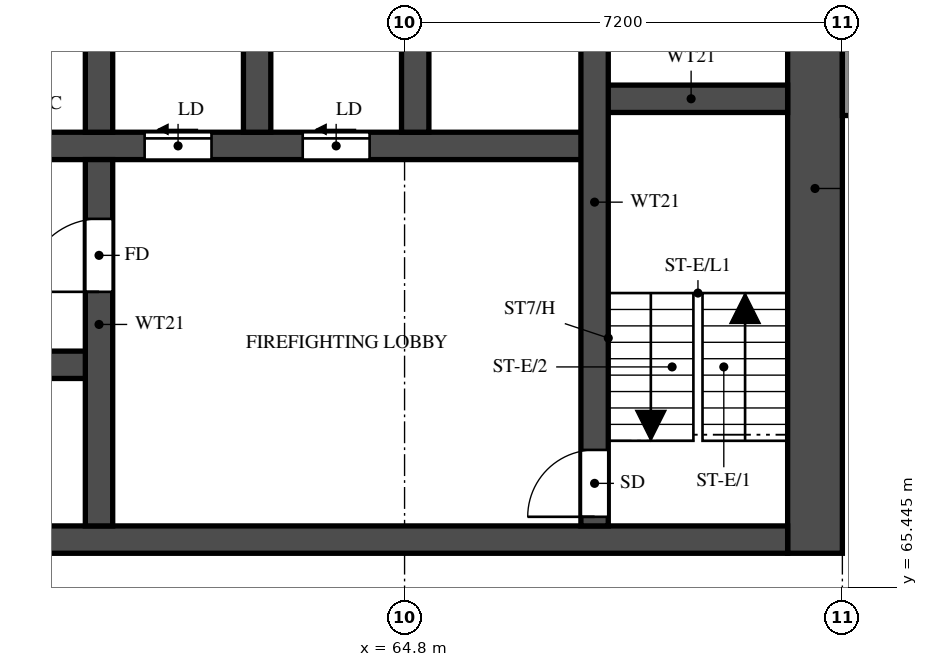
"""IFC4 building model, lengths in metres.
Left out: names, types, materials, properties, quantities, classifications, styles, units other than length and angle.
Written with IfcOpenShell. Run it as: python <this file> out.ifc"""

import sys

from ifc_helpers import new_model, si_unit, direction, frame, frame_2d, origin, place, context, subcontext, project, spatial, rectangle, extrude, element, fill, save


model = new_model("IFC4")
c1 = context("Model", 3, precision=1e-05, world=origin(), true_north=direction((0.0, 1.0)))
c2 = subcontext(c1, "Body", "Model", "MODEL_VIEW")
j1 = project(units=[si_unit("LENGTHUNIT", "METRE"), si_unit("PLANEANGLEUNIT", "RADIAN")], contexts=[c1])
p1 = place(None, origin())
s1 = spatial("IfcSite", under=j1, at=p1, CompositionType="ELEMENT")
p2 = place(p1, origin())
s2 = spatial("IfcBuilding", under=s1, at=p2, CompositionType="ELEMENT")
p3 = place(p2, frame((0.0, 0.0, 100.5)))
s3 = spatial("IfcBuildingStorey", under=s2, at=p3, CompositionType="ELEMENT", Elevation=100.5)
p4 = place(p3, frame((71.55, 66.0, 0.0), z_axis=(0.0, 0.0, 1.0), x_axis=(0.0, 1.0, 0.0)))
e1 = element("IfcWall", 1, at=p4, inside=s3, PredefinedType="SHEAR", context=c2, shape_type="SweptSolid", body=[
    extrude(rectangle(XDim=12.0, YDim=0.9, at=frame_2d((6.0, 0.0))), origin(), (0.0, 0.0, 1.0), 3.18),
])
p5 = place(p3, frame((29.7, 66.225, 0.0), z_axis=(0.0, 0.0, 1.0), x_axis=(1.0, 0.0, 0.0)))
e2 = element("IfcWall", 2, at=p5, inside=s3, PredefinedType="SHEAR", context=c2, shape_type="SweptSolid", body=[
    extrude(rectangle(XDim=41.4, YDim=0.45, at=frame_2d((20.7, 0.0))), origin(), (0.0, 0.0, 1.0), 3.18),
])
p6 = place(p5, frame((0.925, 0.0, 0.0)))
e3 = element("IfcOpeningElement", 3, at=p6, cuts=e2, PredefinedType="OPENING", context=c2, shape_type="SweptSolid", body=[
    extrude(rectangle(XDim=1.1, YDim=2.1, at=frame_2d((0.55, 1.05))), frame((0.0, 0.235, 0.0), z_axis=(0.0, -1.0, 0.0), x_axis=(1.0, 0.0, 0.0)), (0.0, 0.0, 1.0), 0.47),
])
p7 = place(p5, frame((3.738, 0.0, 0.0)))
e4 = element("IfcOpeningElement", 4, at=p7, cuts=e2, PredefinedType="OPENING", context=c2, shape_type="SweptSolid", body=[
    extrude(rectangle(XDim=1.8, YDim=2.1, at=frame_2d((0.9, 1.05))), frame((0.0, 0.235, 0.0), z_axis=(0.0, -1.0, 0.0), x_axis=(1.0, 0.0, 0.0)), (0.0, 0.0, 1.0), 0.47),
])
p8 = place(p3, frame((35.575, 69.1, 0.0), z_axis=(0.0, 0.0, 1.0), x_axis=(1.0, 0.0, 0.0)))
e5 = element("IfcWall", 5, at=p8, inside=s3, PredefinedType="SHEAR", context=c2, shape_type="SweptSolid", body=[
    extrude(rectangle(XDim=24.2, YDim=0.45, at=frame_2d((12.1, 0.0))), origin(), (0.0, 0.0, 1.0), 3.18),
])
p9 = place(p8, frame((1.05, 0.0, 0.0)))
e6 = element("IfcOpeningElement", 6, at=p9, cuts=e5, PredefinedType="OPENING", context=c2, shape_type="SweptSolid", body=[
    extrude(rectangle(XDim=1.1, YDim=2.1, at=frame_2d((0.55, 1.05))), frame((0.0, 0.235, 0.0), z_axis=(0.0, -1.0, 0.0), x_axis=(1.0, 0.0, 0.0)), (0.0, 0.0, 1.0), 0.47),
])
p10 = place(p8, frame((3.8, 0.0, 0.0)))
e7 = element("IfcOpeningElement", 7, at=p10, cuts=e5, PredefinedType="OPENING", context=c2, shape_type="SweptSolid", body=[
    extrude(rectangle(XDim=1.1, YDim=2.1, at=frame_2d((0.55, 1.05))), frame((0.0, 0.235, 0.0), z_axis=(0.0, -1.0, 0.0), x_axis=(1.0, 0.0, 0.0)), (0.0, 0.0, 1.0), 0.47),
])
p11 = place(p8, frame((6.55, 0.0, 0.0)))
e8 = element("IfcOpeningElement", 8, at=p11, cuts=e5, PredefinedType="OPENING", context=c2, shape_type="SweptSolid", body=[
    extrude(rectangle(XDim=1.1, YDim=2.1, at=frame_2d((0.55, 1.05))), frame((0.0, 0.235, 0.0), z_axis=(0.0, -1.0, 0.0), x_axis=(1.0, 0.0, 0.0)), (0.0, 0.0, 1.0), 0.47),
])
p12 = place(p8, frame((9.3, 0.0, 0.0)))
e9 = element("IfcOpeningElement", 9, at=p12, cuts=e5, PredefinedType="OPENING", context=c2, shape_type="SweptSolid", body=[
    extrude(rectangle(XDim=1.1, YDim=2.1, at=frame_2d((0.55, 1.05))), frame((0.0, 0.235, 0.0), z_axis=(0.0, -1.0, 0.0), x_axis=(1.0, 0.0, 0.0)), (0.0, 0.0, 1.0), 0.47),
])
p13 = place(p8, frame((12.05, 0.0, 0.0)))
e10 = element("IfcOpeningElement", 10, at=p13, cuts=e5, PredefinedType="OPENING", context=c2, shape_type="SweptSolid", body=[
    extrude(rectangle(XDim=1.1, YDim=2.1, at=frame_2d((0.55, 1.05))), frame((0.0, 0.235, 0.0), z_axis=(0.0, -1.0, 0.0), x_axis=(1.0, 0.0, 0.0)), (0.0, 0.0, 1.0), 0.47),
])
p14 = place(p8, frame((14.8, 0.0, 0.0)))
e11 = element("IfcOpeningElement", 11, at=p14, cuts=e5, PredefinedType="OPENING", context=c2, shape_type="SweptSolid", body=[
    extrude(rectangle(XDim=1.1, YDim=2.1, at=frame_2d((0.55, 1.05))), frame((0.0, 0.235, 0.0), z_axis=(0.0, -1.0, 0.0), x_axis=(1.0, 0.0, 0.0)), (0.0, 0.0, 1.0), 0.47),
])
p15 = place(p3, frame((32.875, 72.7, 0.0), z_axis=(0.0, 0.0, 1.0), x_axis=(1.0, 0.0, 0.0)))
e12 = element("IfcWall", 12, at=p15, inside=s3, PredefinedType="SHEAR", context=c2, shape_type="SweptSolid", body=[
    extrude(rectangle(XDim=35.05, YDim=0.45, at=frame_2d((17.525, 0.0))), origin(), (0.0, 0.0, 1.0), 3.18),
])
p16 = place(p15, frame((19.8, 0.0, 0.0)))
e13 = element("IfcOpeningElement", 13, at=p16, cuts=e12, PredefinedType="OPENING", context=c2, shape_type="SweptSolid", body=[
    extrude(rectangle(XDim=1.1, YDim=2.1, at=frame_2d((0.55, 1.05))), frame((0.0, 0.235, 0.0), z_axis=(0.0, -1.0, 0.0), x_axis=(1.0, 0.0, 0.0)), (0.0, 0.0, 1.0), 0.47),
])
p17 = place(p15, frame((27.65, 0.0, 0.0)))
e14 = element("IfcOpeningElement", 14, at=p17, cuts=e12, PredefinedType="OPENING", context=c2, shape_type="SweptSolid", body=[
    extrude(rectangle(XDim=1.1, YDim=2.1, at=frame_2d((0.55, 1.05))), frame((0.0, 0.235, 0.0), z_axis=(0.0, -1.0, 0.0), x_axis=(1.0, 0.0, 0.0)), (0.0, 0.0, 1.0), 0.47),
])
p18 = place(p15, frame((30.25, 0.0, 0.0)))
e15 = element("IfcOpeningElement", 15, at=p18, cuts=e12, PredefinedType="OPENING", context=c2, shape_type="SweptSolid", body=[
    extrude(rectangle(XDim=1.1, YDim=2.1, at=frame_2d((0.55, 1.05))), frame((0.0, 0.235, 0.0), z_axis=(0.0, -1.0, 0.0), x_axis=(1.0, 0.0, 0.0)), (0.0, 0.0, 1.0), 0.47),
])
p19 = place(p15, frame((3.75, 0.0, 0.0)))
e16 = element("IfcOpeningElement", 16, at=p19, cuts=e12, PredefinedType="OPENING", context=c2, shape_type="SweptSolid", body=[
    extrude(rectangle(XDim=1.1, YDim=2.1, at=frame_2d((0.55, 1.05))), frame((0.0, 0.235, 0.0), z_axis=(0.0, -1.0, 0.0), x_axis=(1.0, 0.0, 0.0)), (0.0, 0.0, 1.0), 0.47),
])
p20 = place(p15, frame((6.5, 0.0, 0.0)))
e17 = element("IfcOpeningElement", 17, at=p20, cuts=e12, PredefinedType="OPENING", context=c2, shape_type="SweptSolid", body=[
    extrude(rectangle(XDim=1.1, YDim=2.1, at=frame_2d((0.55, 1.05))), frame((0.0, 0.235, 0.0), z_axis=(0.0, -1.0, 0.0), x_axis=(1.0, 0.0, 0.0)), (0.0, 0.0, 1.0), 0.47),
])
p21 = place(p15, frame((9.25, 0.0, 0.0)))
e18 = element("IfcOpeningElement", 18, at=p21, cuts=e12, PredefinedType="OPENING", context=c2, shape_type="SweptSolid", body=[
    extrude(rectangle(XDim=1.1, YDim=2.1, at=frame_2d((0.55, 1.05))), frame((0.0, 0.235, 0.0), z_axis=(0.0, -1.0, 0.0), x_axis=(1.0, 0.0, 0.0)), (0.0, 0.0, 1.0), 0.47),
])
p22 = place(p15, frame((12.0, 0.0, 0.0)))
e19 = element("IfcOpeningElement", 19, at=p22, cuts=e12, PredefinedType="OPENING", context=c2, shape_type="SweptSolid", body=[
    extrude(rectangle(XDim=1.1, YDim=2.1, at=frame_2d((0.55, 1.05))), frame((0.0, 0.235, 0.0), z_axis=(0.0, -1.0, 0.0), x_axis=(1.0, 0.0, 0.0)), (0.0, 0.0, 1.0), 0.47),
])
p23 = place(p15, frame((14.75, 0.0, 0.0)))
e20 = element("IfcOpeningElement", 20, at=p23, cuts=e12, PredefinedType="OPENING", context=c2, shape_type="SweptSolid", body=[
    extrude(rectangle(XDim=1.1, YDim=2.1, at=frame_2d((0.55, 1.05))), frame((0.0, 0.235, 0.0), z_axis=(0.0, -1.0, 0.0), x_axis=(1.0, 0.0, 0.0)), (0.0, 0.0, 1.0), 0.47),
])
p24 = place(p15, frame((17.5, 0.0, 0.0)))
e21 = element("IfcOpeningElement", 21, at=p24, cuts=e12, PredefinedType="OPENING", context=c2, shape_type="SweptSolid", body=[
    extrude(rectangle(XDim=1.1, YDim=2.1, at=frame_2d((0.55, 1.05))), frame((0.0, 0.235, 0.0), z_axis=(0.0, -1.0, 0.0), x_axis=(1.0, 0.0, 0.0)), (0.0, 0.0, 1.0), 0.47),
])
p25 = place(p15, frame((0.913, 0.0, 0.0)))
e22 = element("IfcOpeningElement", 22, at=p25, cuts=e12, PredefinedType="OPENING", context=c2, shape_type="SweptSolid", body=[
    extrude(rectangle(XDim=1.1, YDim=2.1, at=frame_2d((0.55, 1.05))), frame((0.0, 0.235, 0.0), z_axis=(0.0, -1.0, 0.0), x_axis=(1.0, 0.0, 0.0)), (0.0, 0.0, 1.0), 0.47),
])
p26 = place(p3, frame((67.925, 73.475, 0.0), z_axis=(0.0, 0.0, 1.0), x_axis=(1.0, 0.0, 0.0)))
e23 = element("IfcWall", 23, at=p26, inside=s3, PredefinedType="SHEAR", context=c2, shape_type="SweptSolid", body=[
    extrude(rectangle(XDim=3.175, YDim=0.45, at=frame_2d((1.587, 0.0))), origin(), (0.0, 0.0, 1.0), 3.18),
])
p27 = place(p3, frame((67.925, 66.45, 0.0), z_axis=(0.0, 0.0, 1.0), x_axis=(0.0, 1.0, 0.0)))
e24 = element("IfcWall", 24, at=p27, inside=s3, PredefinedType="SHEAR", context=c2, shape_type="SweptSolid", body=[
    extrude(rectangle(XDim=10.65, YDim=0.45, at=frame_2d((5.325, 0.0))), origin(), (0.0, 0.0, 1.0), 3.18),
])
p28 = place(p27, frame((0.15, 0.0, 0.0)))
e25 = element("IfcOpeningElement", 25, at=p28, cuts=e24, PredefinedType="OPENING", context=c2, shape_type="SweptSolid", body=[
    extrude(rectangle(XDim=1.1, YDim=2.1, at=frame_2d((0.55, 1.05))), frame((0.0, 0.235, 0.0), z_axis=(0.0, -1.0, 0.0), x_axis=(1.0, 0.0, 0.0)), (0.0, 0.0, 1.0), 0.47),
])
p29 = place(p3, frame((59.775, 66.45, 0.0), z_axis=(0.0, 0.0, 1.0), x_axis=(0.0, 1.0, 0.0)))
e26 = element("IfcWall", 26, at=p29, inside=s3, PredefinedType="SHEAR", context=c2, shape_type="SweptSolid", body=[
    extrude(rectangle(XDim=6.025, YDim=0.45, at=frame_2d((3.013, 0.0))), origin(), (0.0, 0.0, 1.0), 3.18),
])
p30 = place(p29, frame((3.85, 0.0, 0.0)))
e27 = element("IfcOpeningElement", 27, at=p30, cuts=e26, PredefinedType="OPENING", context=c2, shape_type="SweptSolid", body=[
    extrude(rectangle(XDim=1.2, YDim=2.1, at=frame_2d((0.6, 1.05))), frame((0.0, 0.235, 0.0), z_axis=(0.0, -1.0, 0.0), x_axis=(1.0, 0.0, 0.0)), (0.0, 0.0, 1.0), 0.47),
])
for number, where, z_axis, x_axis in (
    (28, (59.775, 72.925, 0.0), (0.0, 0.0, 1.0), (0.0, 1.0, 0.0)),
    (29, (62.375, 72.925, 0.0), (0.0, 0.0, 1.0), (0.0, 1.0, 0.0)),
    (30, (64.975, 72.925, 0.0), (0.0, 0.0, 1.0), (0.0, 1.0, 0.0)),
):
    element("IfcWall", number, at=place(p3, frame(where, z_axis=z_axis, x_axis=x_axis)), inside=s3, PredefinedType="SHEAR", context=c2, shape_type="SweptSolid", body=[
        extrude(rectangle(XDim=2.95, YDim=0.45, at=frame_2d((1.475, 0.0))), origin(), (0.0, 0.0, 1.0), 3.18),
    ])
p31 = place(p3, frame((72.1, 73.2, 0.0), z_axis=(0.0, 0.0, 1.0), x_axis=(0.0, 1.0, 0.0)))
e31 = element("IfcWall", 31, at=p31, inside=s3, PredefinedType="SOLIDWALL", context=c2, shape_type="SweptSolid", body=[
    extrude(rectangle(XDim=4.8, YDim=0.2, at=frame_2d((2.4, 0.0))), origin(), (0.0, 0.0, 1.0), 3.18),
])
p32 = place(p28, origin())
e32 = element("IfcDoor", 32, at=p32, inside=s3, OperationType="SINGLE_SWING_LEFT", PredefinedType="DOOR", context=c2, shape_type="SweptSolid", body=[
    extrude(rectangle(XDim=1.1, YDim=2.1, at=frame_2d((0.55, 1.05))), frame((0.0, 0.025, 0.0), z_axis=(0.0, -1.0, 0.0), x_axis=(1.0, 0.0, 0.0)), (0.0, 0.0, 1.0), 0.05),
])
fill(e25, e32)
p33 = place(p30, origin())
e33 = element("IfcDoor", 33, at=p33, inside=s3, OperationType="SINGLE_SWING_RIGHT", PredefinedType="DOOR", context=c2, shape_type="SweptSolid", body=[
    extrude(rectangle(XDim=1.2, YDim=2.1, at=frame_2d((0.6, 1.05))), frame((0.0, 0.025, 0.0), z_axis=(0.0, -1.0, 0.0), x_axis=(1.0, 0.0, 0.0)), (0.0, 0.0, 1.0), 0.05),
])
fill(e27, e33)
p34 = place(p17, origin())
e34 = element("IfcDoor", 34, at=p34, inside=s3, OperationType="SLIDING_TO_LEFT", PredefinedType="DOOR", context=c2, shape_type="SweptSolid", body=[
    extrude(rectangle(XDim=1.1, YDim=2.1, at=frame_2d((0.55, 1.05))), frame((0.0, 0.025, 0.0), z_axis=(0.0, -1.0, 0.0), x_axis=(1.0, 0.0, 0.0)), (0.0, 0.0, 1.0), 0.05),
])
fill(e14, e34)
p35 = place(p18, origin())
e35 = element("IfcDoor", 35, at=p35, inside=s3, OperationType="SLIDING_TO_LEFT", PredefinedType="DOOR", context=c2, shape_type="SweptSolid", body=[
    extrude(rectangle(XDim=1.1, YDim=2.1, at=frame_2d((0.55, 1.05))), frame((0.0, 0.025, 0.0), z_axis=(0.0, -1.0, 0.0), x_axis=(1.0, 0.0, 0.0)), (0.0, 0.0, 1.0), 0.05),
])
fill(e15, e35)
save(model, sys.argv[1])
